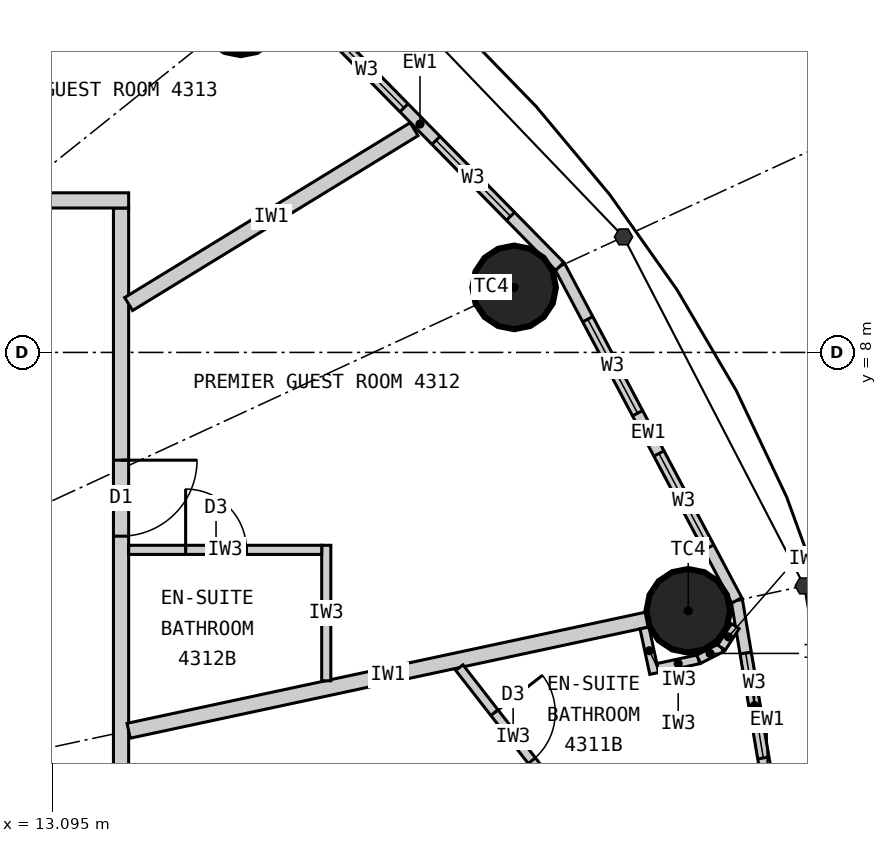
"""IFC4 building model, lengths in metres.
Left out: names, types, materials, properties, quantities, classifications, styles, units other than length and angle.
Written with IfcOpenShell. Run it as: python <this file> out.ifc"""

import sys

from ifc_helpers import new_model, si_unit, direction, frame, frame_2d, origin, origin_2d, place, context, subcontext, project, spatial, rectangle, circle, extrude, element, fill, save


model = new_model("IFC4")
c1 = context("Model", 3, precision=1e-05, world=origin(), true_north=direction((0.0, 1.0)))
c2 = subcontext(c1, "Body", "Model", "MODEL_VIEW")
j1 = project(units=[si_unit("LENGTHUNIT", "METRE"), si_unit("PLANEANGLEUNIT", "RADIAN")], contexts=[c1])
p1 = place(None, origin())
s1 = spatial("IfcSite", under=j1, at=p1, CompositionType="ELEMENT")
p2 = place(p1, origin())
s2 = spatial("IfcBuilding", under=s1, at=p2, CompositionType="ELEMENT")
p3 = place(p2, frame((0.0, 0.0, 163.2)))
s3 = spatial("IfcBuildingStorey", under=s2, at=p3, CompositionType="ELEMENT", Elevation=163.2)
for number, where, z_axis, x_axis in (
    (1, (21.463, 4.601, 0.0), (0.0, 0.0, 1.0), (1.0, 0.0, 0.0)),
    (2, (19.172, 8.855, 0.0), (0.0, 0.0, 1.0), (1.0, 0.0, 0.0)),
    (3, (15.576, 12.461, 0.0), (0.0, 0.0, 1.0), (1.0, 0.0, 0.0)),
):
    element("IfcColumn", number, at=place(p3, frame(where, z_axis=z_axis, x_axis=x_axis)), inside=s3, PredefinedType="COLUMN", context=c2, shape_type="SweptSolid", body=[
        extrude(circle(Radius=0.55, at=origin_2d()), origin(), (0.0, 0.0, 1.0), 3.3),
    ])
p4 = place(p3, frame((22.9, 0.0, 0.0), z_axis=(0.0, 0.0, 1.0), x_axis=(-0.166162111254, 0.986098449843, 0.0)))
e4 = element("IfcWall", 4, at=p4, inside=s3, PredefinedType="ELEMENTEDWALL", context=c2, shape_type="SweptSolid", body=[
    extrude(rectangle(XDim=4.805, YDim=0.15, at=frame_2d((2.402, 0.0))), origin(), (0.0, 0.0, 1.0), 3.12),
])
p5 = place(p4, frame((0.702, 0.0, 0.9)))
e5 = element("IfcOpeningElement", 5, at=p5, cuts=e4, PredefinedType="OPENING", context=c2, shape_type="SweptSolid", body=[
    extrude(rectangle(XDim=1.4, YDim=1.9, at=frame_2d((0.7, 0.95))), frame((0.0, 0.085, 0.0), z_axis=(0.0, -1.0, 0.0), x_axis=(1.0, 0.0, 0.0)), (0.0, 0.0, 1.0), 0.17),
])
p6 = place(p4, frame((2.702, 0.0, 0.9)))
e6 = element("IfcOpeningElement", 6, at=p6, cuts=e4, PredefinedType="OPENING", context=c2, shape_type="SweptSolid", body=[
    extrude(rectangle(XDim=1.4, YDim=1.9, at=frame_2d((0.7, 0.95))), frame((0.0, 0.085, 0.0), z_axis=(0.0, -1.0, 0.0), x_axis=(1.0, 0.0, 0.0)), (0.0, 0.0, 1.0), 0.17),
])
p7 = place(p3, frame((22.102, 4.738, 0.0), z_axis=(0.0, 0.0, 1.0), x_axis=(-0.468428906714, 0.883501193748, 0.0)))
e7 = element("IfcWall", 7, at=p7, inside=s3, PredefinedType="ELEMENTEDWALL", context=c2, shape_type="SweptSolid", body=[
    extrude(rectangle(XDim=4.974, YDim=0.15, at=frame_2d((2.487, 0.0))), origin(), (0.0, 0.0, 1.0), 3.12),
])
p8 = place(p7, frame((0.787, 0.0, 0.9)))
e8 = element("IfcOpeningElement", 8, at=p8, cuts=e7, PredefinedType="OPENING", context=c2, shape_type="SweptSolid", body=[
    extrude(rectangle(XDim=1.4, YDim=1.9, at=frame_2d((0.7, 0.95))), frame((0.0, 0.085, 0.0), z_axis=(0.0, -1.0, 0.0), x_axis=(1.0, 0.0, 0.0)), (0.0, 0.0, 1.0), 0.17),
])
p9 = place(p7, frame((2.787, 0.0, 0.9)))
e9 = element("IfcOpeningElement", 9, at=p9, cuts=e7, PredefinedType="OPENING", context=c2, shape_type="SweptSolid", body=[
    extrude(rectangle(XDim=1.4, YDim=1.9, at=frame_2d((0.7, 0.95))), frame((0.0, 0.085, 0.0), z_axis=(0.0, -1.0, 0.0), x_axis=(1.0, 0.0, 0.0)), (0.0, 0.0, 1.0), 0.17),
])
p10 = place(p3, frame((19.772, 9.132, 0.0), z_axis=(0.0, 0.0, 1.0), x_axis=(-0.700727467776, 0.71342905457, 0.0)))
e10 = element("IfcWall", 10, at=p10, inside=s3, PredefinedType="ELEMENTEDWALL", context=c2, shape_type="SweptSolid", body=[
    extrude(rectangle(XDim=5.247, YDim=0.15, at=frame_2d((2.624, 0.0))), origin(), (0.0, 0.0, 1.0), 3.12),
])
p11 = place(p10, frame((0.924, 0.0, 0.9)))
e11 = element("IfcOpeningElement", 11, at=p11, cuts=e10, PredefinedType="OPENING", context=c2, shape_type="SweptSolid", body=[
    extrude(rectangle(XDim=1.4, YDim=1.9, at=frame_2d((0.7, 0.95))), frame((0.0, 0.085, 0.0), z_axis=(0.0, -1.0, 0.0), x_axis=(1.0, 0.0, 0.0)), (0.0, 0.0, 1.0), 0.17),
])
p12 = place(p10, frame((2.924, 0.0, 0.9)))
e12 = element("IfcOpeningElement", 12, at=p12, cuts=e10, PredefinedType="OPENING", context=c2, shape_type="SweptSolid", body=[
    extrude(rectangle(XDim=1.4, YDim=1.9, at=frame_2d((0.7, 0.95))), frame((0.0, 0.085, 0.0), z_axis=(0.0, -1.0, 0.0), x_axis=(1.0, 0.0, 0.0)), (0.0, 0.0, 1.0), 0.17),
])
p13 = place(p3, frame((14.0, -9.9, 0.0), z_axis=(0.0, 0.0, 1.0), x_axis=(0.0, 1.0, 0.0)))
e13 = element("IfcWall", 13, at=p13, inside=s3, PredefinedType="PARTITIONING", context=c2, shape_type="SweptSolid", body=[
    extrude(rectangle(XDim=19.8, YDim=0.2, at=frame_2d((9.9, 0.0))), origin(), (0.0, 0.0, 1.0), 3.12),
])
p14 = place(p13, frame((3.824, 0.0, 0.0)))
e14 = element("IfcOpeningElement", 14, at=p14, cuts=e13, PredefinedType="OPENING", context=c2, shape_type="SweptSolid", body=[
    extrude(rectangle(XDim=1.0, YDim=2.2, at=frame_2d((0.5, 1.1))), frame((0.0, 0.11, 0.0), z_axis=(0.0, -1.0, 0.0), x_axis=(1.0, 0.0, 0.0)), (0.0, 0.0, 1.0), 0.22),
])
p15 = place(p13, frame((8.719, 0.0, 0.0)))
e15 = element("IfcOpeningElement", 15, at=p15, cuts=e13, PredefinedType="OPENING", context=c2, shape_type="SweptSolid", body=[
    extrude(rectangle(XDim=1.0, YDim=2.2, at=frame_2d((0.5, 1.1))), frame((0.0, 0.11, 0.0), z_axis=(0.0, -1.0, 0.0), x_axis=(1.0, 0.0, 0.0)), (0.0, 0.0, 1.0), 0.22),
])
p16 = place(p13, frame((15.482, 0.0, 0.0)))
e16 = element("IfcOpeningElement", 16, at=p16, cuts=e13, PredefinedType="OPENING", context=c2, shape_type="SweptSolid", body=[
    extrude(rectangle(XDim=1.0, YDim=2.2, at=frame_2d((0.5, 1.1))), frame((0.0, 0.11, 0.0), z_axis=(0.0, -1.0, 0.0), x_axis=(1.0, 0.0, 0.0)), (0.0, 0.0, 1.0), 0.22),
])
p17 = place(p3, frame((14.1, 3.022, 0.0), z_axis=(0.0, 0.0, 1.0), x_axis=(0.977790639684, 0.209584028367, 0.0)))
e17 = element("IfcWall", 17, at=p17, inside=s3, PredefinedType="PARTITIONING", context=c2, shape_type="SweptSolid", body=[
    extrude(rectangle(XDim=6.98, YDim=0.2, at=frame_2d((3.49, 0.0))), origin(), (0.0, 0.0, 1.0), 2.42),
])
p18 = place(p3, frame((14.1, 8.636, 0.0), z_axis=(0.0, 0.0, 1.0), x_axis=(0.852731884196, 0.522348862041, 0.0)))
e18 = element("IfcWall", 18, at=p18, inside=s3, PredefinedType="PARTITIONING", context=c2, shape_type="SweptSolid", body=[
    extrude(rectangle(XDim=4.404, YDim=0.2, at=frame_2d((2.202, 0.0))), origin(), (0.0, 0.0, 1.0), 3.12),
])
p19 = place(p3, frame((18.451, 3.853, 0.0), z_axis=(0.0, 0.0, 1.0), x_axis=(0.614703538382, -0.788758239197, 0.0)))
e19 = element("IfcWall", 19, at=p19, inside=s3, PredefinedType="PARTITIONING", context=c2, shape_type="SweptSolid", body=[
    extrude(rectangle(XDim=2.303, YDim=0.12, at=frame_2d((1.152, 0.0))), origin(), (0.0, 0.0, 1.0), 3.12),
])
p20 = place(p19, frame((0.752, 0.0, 0.0)))
e20 = element("IfcOpeningElement", 20, at=p20, cuts=e19, PredefinedType="OPENING", context=c2, shape_type="SweptSolid", body=[
    extrude(rectangle(XDim=0.8, YDim=2.1, at=frame_2d((0.4, 1.05))), frame((0.0, 0.07, 0.0), z_axis=(0.0, -1.0, 0.0), x_axis=(1.0, 0.0, 0.0)), (0.0, 0.0, 1.0), 0.14),
])
p21 = place(p3, frame((20.887, 4.375, 0.0), z_axis=(0.0, 0.0, 1.0), x_axis=(0.209746941802, -0.977755705892, 0.0)))
e21 = element("IfcWall", 21, at=p21, inside=s3, PredefinedType="PARTITIONING", context=c2, shape_type="SweptSolid", body=[
    extrude(rectangle(XDim=0.612, YDim=0.12, at=frame_2d((0.306, 0.0))), origin(), (0.0, 0.0, 1.0), 3.12),
])
p22 = place(p3, frame((21.062, 3.848, 0.0), z_axis=(0.0, 0.0, 1.0), x_axis=(0.977789415726, 0.209589738521, 0.0)))
e22 = element("IfcWall", 22, at=p22, inside=s3, PredefinedType="PARTITIONING", context=c2, shape_type="SweptSolid", body=[
    extrude(rectangle(XDim=0.55, YDim=0.12, at=frame_2d((0.275, 0.0))), origin(), (0.0, 0.0, 1.0), 3.12),
])
p23 = place(p3, frame((21.599, 3.963, 0.0), z_axis=(0.0, 0.0, 1.0), x_axis=(0.890193602875, 0.455582428766, 0.0)))
e23 = element("IfcWall", 23, at=p23, inside=s3, PredefinedType="PARTITIONING", context=c2, shape_type="SweptSolid", body=[
    extrude(rectangle(XDim=0.338, YDim=0.12, at=frame_2d((0.169, 0.0))), origin(), (0.0, 0.0, 1.0), 3.12),
])
p24 = place(p3, frame((21.9, 4.117, 0.0), z_axis=(0.0, 0.0, 1.0), x_axis=(0.543582688681, 0.839355622228, 0.0)))
e24 = element("IfcWall", 24, at=p24, inside=s3, PredefinedType="PARTITIONING", context=c2, shape_type="SweptSolid", body=[
    extrude(rectangle(XDim=0.336, YDim=0.12, at=frame_2d((0.168, 0.0))), origin(), (0.0, 0.0, 1.0), 3.12),
])
p25 = place(p3, frame((16.7, 3.68, 0.0), z_axis=(0.0, 0.0, 1.0), x_axis=(0.0, 1.0, 0.0)))
e25 = element("IfcWall", 25, at=p25, inside=s3, PredefinedType="PARTITIONING", context=c2, shape_type="SweptSolid", body=[
    extrude(rectangle(XDim=1.783, YDim=0.12, at=frame_2d((0.891, 0.0))), origin(), (0.0, 0.0, 1.0), 3.12),
])
p26 = place(p3, frame((14.1, 5.403, 0.0), z_axis=(0.0, 0.0, 1.0), x_axis=(1.0, 0.0, 0.0)))
e26 = element("IfcWall", 26, at=p26, inside=s3, PredefinedType="PARTITIONING", context=c2, shape_type="SweptSolid", body=[
    extrude(rectangle(XDim=2.54, YDim=0.12, at=frame_2d((1.27, 0.0))), origin(), (0.0, 0.0, 1.0), 3.12),
])
p27 = place(p26, frame((0.75, 0.0, 0.0)))
e27 = element("IfcOpeningElement", 27, at=p27, cuts=e26, PredefinedType="OPENING", context=c2, shape_type="SweptSolid", body=[
    extrude(rectangle(XDim=0.8, YDim=2.1, at=frame_2d((0.4, 1.05))), frame((0.0, 0.07, 0.0), z_axis=(0.0, -1.0, 0.0), x_axis=(1.0, 0.0, 0.0)), (0.0, 0.0, 1.0), 0.14),
])
p28 = place(p3, frame((3.518, 10.0, 0.0), z_axis=(0.0, 0.0, 1.0), x_axis=(1.0, 0.0, 0.0)))
e28 = element("IfcWall", 28, at=p28, inside=s3, PredefinedType="PARTITIONING", context=c2, shape_type="SweptSolid", body=[
    extrude(rectangle(XDim=10.582, YDim=0.2, at=frame_2d((5.291, 0.0))), origin(), (0.0, 0.0, 1.0), 3.12),
])
p29 = place(p28, frame((4.621, 0.0, 0.0)))
e29 = element("IfcOpeningElement", 29, at=p29, cuts=e28, PredefinedType="OPENING", context=c2, shape_type="SweptSolid", body=[
    extrude(rectangle(XDim=1.0, YDim=2.2, at=frame_2d((0.5, 1.1))), frame((0.0, 0.11, 0.0), z_axis=(0.0, -1.0, 0.0), x_axis=(1.0, 0.0, 0.0)), (0.0, 0.0, 1.0), 0.22),
])
p30 = place(p6, origin())
e30 = element("IfcWindow", 30, at=p30, inside=s3, PartitioningType="SINGLE_PANEL", PredefinedType="WINDOW", context=c2, shape_type="SweptSolid", body=[
    extrude(rectangle(XDim=1.4, YDim=1.9, at=frame_2d((0.7, 0.95))), frame((0.0, 0.03, 0.0), z_axis=(0.0, -1.0, 0.0), x_axis=(1.0, 0.0, 0.0)), (0.0, 0.0, 1.0), 0.06),
])
fill(e6, e30)
p31 = place(p8, origin())
e31 = element("IfcWindow", 31, at=p31, inside=s3, PartitioningType="SINGLE_PANEL", PredefinedType="WINDOW", context=c2, shape_type="SweptSolid", body=[
    extrude(rectangle(XDim=1.4, YDim=1.9, at=frame_2d((0.7, 0.95))), frame((0.0, 0.03, 0.0), z_axis=(0.0, -1.0, 0.0), x_axis=(1.0, 0.0, 0.0)), (0.0, 0.0, 1.0), 0.06),
])
fill(e8, e31)
p32 = place(p9, origin())
e32 = element("IfcWindow", 32, at=p32, inside=s3, PartitioningType="SINGLE_PANEL", PredefinedType="WINDOW", context=c2, shape_type="SweptSolid", body=[
    extrude(rectangle(XDim=1.4, YDim=1.9, at=frame_2d((0.7, 0.95))), frame((0.0, 0.03, 0.0), z_axis=(0.0, -1.0, 0.0), x_axis=(1.0, 0.0, 0.0)), (0.0, 0.0, 1.0), 0.06),
])
fill(e9, e32)
p33 = place(p11, origin())
e33 = element("IfcWindow", 33, at=p33, inside=s3, PartitioningType="SINGLE_PANEL", PredefinedType="WINDOW", context=c2, shape_type="SweptSolid", body=[
    extrude(rectangle(XDim=1.4, YDim=1.9, at=frame_2d((0.7, 0.95))), frame((0.0, 0.03, 0.0), z_axis=(0.0, -1.0, 0.0), x_axis=(1.0, 0.0, 0.0)), (0.0, 0.0, 1.0), 0.06),
])
fill(e11, e33)
p34 = place(p12, origin())
e34 = element("IfcWindow", 34, at=p34, inside=s3, PartitioningType="SINGLE_PANEL", PredefinedType="WINDOW", context=c2, shape_type="SweptSolid", body=[
    extrude(rectangle(XDim=1.4, YDim=1.9, at=frame_2d((0.7, 0.95))), frame((0.0, 0.03, 0.0), z_axis=(0.0, -1.0, 0.0), x_axis=(1.0, 0.0, 0.0)), (0.0, 0.0, 1.0), 0.06),
])
fill(e12, e34)
p35 = place(p20, origin())
e35 = element("IfcDoor", 35, at=p35, inside=s3, OperationType="SINGLE_SWING_LEFT", PredefinedType="DOOR", context=c2, shape_type="SweptSolid", body=[
    extrude(rectangle(XDim=0.8, YDim=2.1, at=frame_2d((0.4, 1.05))), frame((0.0, 0.025, 0.0), z_axis=(0.0, -1.0, 0.0), x_axis=(1.0, 0.0, 0.0)), (0.0, 0.0, 1.0), 0.05),
])
fill(e20, e35)
p36 = place(p27, origin())
e36 = element("IfcDoor", 36, at=p36, inside=s3, OperationType="SINGLE_SWING_LEFT", PredefinedType="DOOR", context=c2, shape_type="SweptSolid", body=[
    extrude(rectangle(XDim=0.8, YDim=2.1, at=frame_2d((0.4, 1.05))), frame((0.0, 0.025, 0.0), z_axis=(0.0, -1.0, 0.0), x_axis=(1.0, 0.0, 0.0)), (0.0, 0.0, 1.0), 0.05),
])
fill(e27, e36)
p37 = place(p16, origin())
e37 = element("IfcDoor", 37, at=p37, inside=s3, OperationType="SINGLE_SWING_RIGHT", PredefinedType="DOOR", context=c2, shape_type="SweptSolid", body=[
    extrude(rectangle(XDim=1.0, YDim=2.2, at=frame_2d((0.5, 1.1))), frame((0.0, 0.025, 0.0), z_axis=(0.0, -1.0, 0.0), x_axis=(1.0, 0.0, 0.0)), (0.0, 0.0, 1.0), 0.05),
])
fill(e16, e37)
save(model, sys.argv[1])
